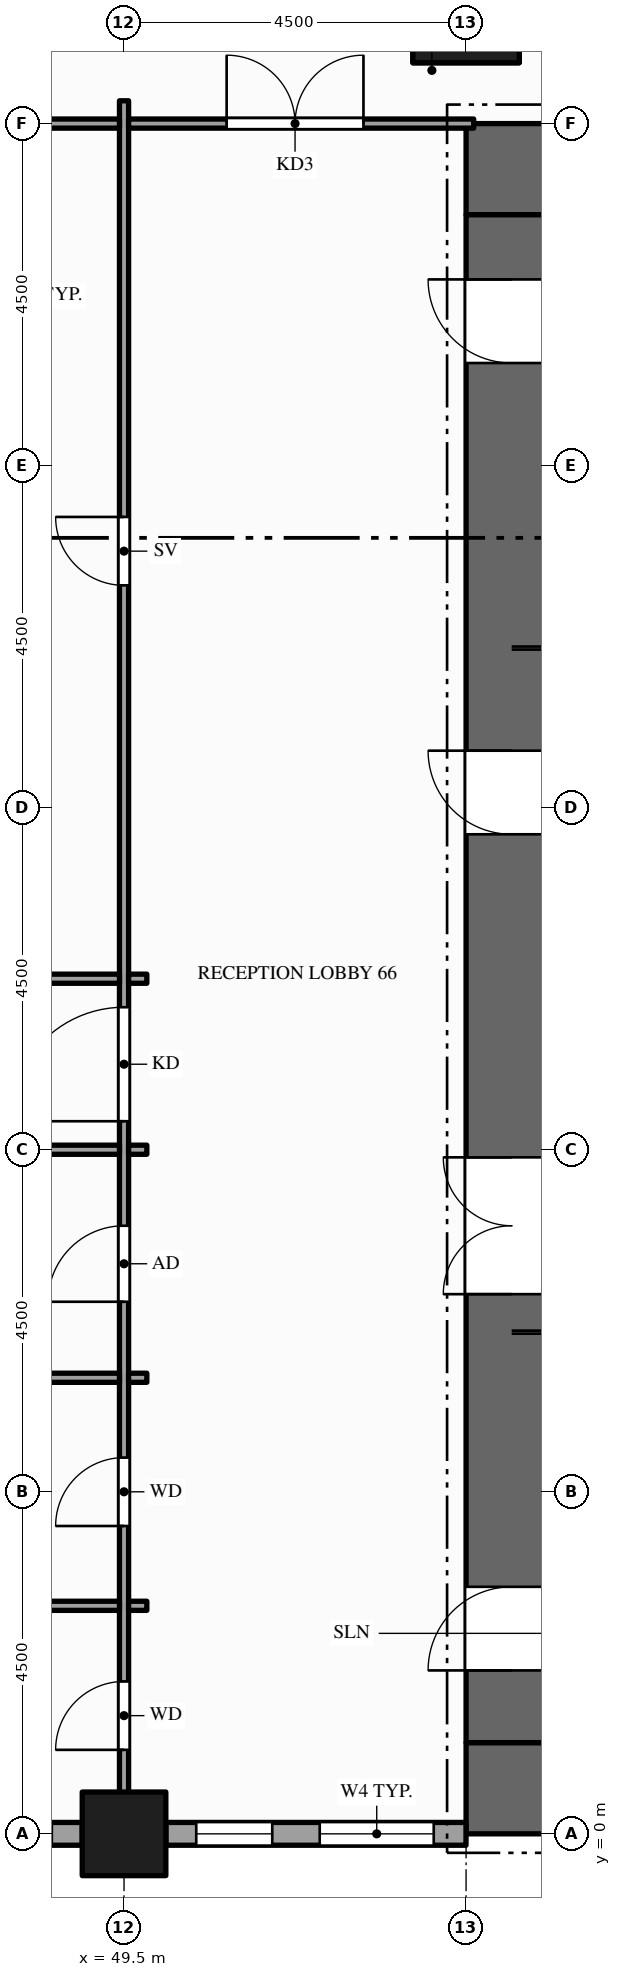
"""IFC4 building model, lengths in metres.
Left out: names, types, materials, properties, quantities, classifications, styles, units other than length and angle.
Written with IfcOpenShell. Run it as: python <this file> out.ifc"""

import sys

from ifc_helpers import new_model, si_unit, direction, frame, frame_2d, origin, origin_2d, place, context, subcontext, project, spatial, rectangle, hollow_rectangle, extrude, element, fill, save


model = new_model("IFC4")
c1 = context("Model", 3, precision=1e-05, world=origin(), true_north=direction((0.0, 1.0)))
c2 = subcontext(c1, "Body", "Model", "MODEL_VIEW")
j1 = project(units=[si_unit("LENGTHUNIT", "METRE"), si_unit("PLANEANGLEUNIT", "RADIAN")], contexts=[c1])
p1 = place(None, origin())
s1 = spatial("IfcSite", under=j1, at=p1, CompositionType="ELEMENT")
p2 = place(p1, origin())
s2 = spatial("IfcBuilding", under=s1, at=p2, CompositionType="ELEMENT")
p3 = place(p2, frame((0.0, 0.0, 24.0)))
s3 = spatial("IfcBuildingStorey", under=s2, at=p3, CompositionType="ELEMENT", Elevation=24.0)
for number, where, z_axis, x_axis in (
    (1, (67.5, 0.6, -0.15), (0.0, 0.0, 1.0), (-1.0, 0.0, 0.0)),
    (2, (54.0, 21.9, -0.15), (0.0, 0.0, 1.0), (1.0, 0.0, 0.0)),
):
    element("IfcWall", number, at=place(p3, frame(where, z_axis=z_axis, x_axis=x_axis)), inside=s3, PredefinedType="SHEAR", context=c2, shape_type="SweptSolid", body=[
        extrude(rectangle(XDim=13.5, YDim=1.2, at=frame_2d((6.75, 0.0))), origin(), (0.0, 0.0, 1.0), 5.0),
    ])
p4 = place(p3, frame((54.6, 1.2, -0.15), z_axis=(0.0, 0.0, 1.0), x_axis=(0.0, 1.0, 0.0)))
e3 = element("IfcWall", 3, at=p4, inside=s3, PredefinedType="SHEAR", context=c2, shape_type="SweptSolid", body=[
    extrude(rectangle(XDim=20.1, YDim=1.2, at=frame_2d((10.05, 0.0))), origin(), (0.0, 0.0, 1.0), 5.0),
])
p5 = place(p4, frame((5.9, 0.0, 0.15)))
e4 = element("IfcOpeningElement", 4, at=p5, cuts=e3, PredefinedType="OPENING", context=c2, shape_type="SweptSolid", body=[
    extrude(rectangle(XDim=1.8, YDim=2.1, at=frame_2d((0.9, 1.05))), frame((0.0, 0.61, 0.0), z_axis=(0.0, -1.0, 0.0), x_axis=(1.0, 0.0, 0.0)), (0.0, 0.0, 1.0), 1.22),
])
p6 = place(p4, frame((11.95, 0.0, 0.15)))
e5 = element("IfcOpeningElement", 5, at=p6, cuts=e3, PredefinedType="OPENING", context=c2, shape_type="SweptSolid", body=[
    extrude(rectangle(XDim=1.1, YDim=2.1, at=frame_2d((0.55, 1.05))), frame((0.0, 0.61, 0.0), z_axis=(0.0, -1.0, 0.0), x_axis=(1.0, 0.0, 0.0)), (0.0, 0.0, 1.0), 1.22),
])
p7 = place(p4, frame((0.95, 0.0, 0.15)))
e6 = element("IfcOpeningElement", 6, at=p7, cuts=e3, PredefinedType="OPENING", context=c2, shape_type="SweptSolid", body=[
    extrude(rectangle(XDim=1.1, YDim=2.1, at=frame_2d((0.55, 1.05))), frame((0.0, 0.61, 0.0), z_axis=(0.0, -1.0, 0.0), x_axis=(1.0, 0.0, 0.0)), (0.0, 0.0, 1.0), 1.22),
])
p8 = place(p4, frame((18.15, 0.0, 0.15)))
e7 = element("IfcOpeningElement", 7, at=p8, cuts=e3, PredefinedType="OPENING", context=c2, shape_type="SweptSolid", body=[
    extrude(rectangle(XDim=1.1, YDim=2.1, at=frame_2d((0.55, 1.05))), frame((0.0, 0.61, 0.0), z_axis=(0.0, -1.0, 0.0), x_axis=(1.0, 0.0, 0.0)), (0.0, 0.0, 1.0), 1.22),
])
p9 = place(p3, frame((49.5, 0.0, -0.25), z_axis=(0.0, 0.0, 1.0), x_axis=(1.0, 0.0, 0.0)))
e8 = element("IfcColumn", 8, at=p9, inside=s3, PredefinedType="COLUMN", context=c2, shape_type="SweptSolid", body=[
    extrude(hollow_rectangle(XDim=1.1, YDim=1.1, WallThickness=0.06, at=origin_2d()), origin(), (0.0, 0.0, 1.0), 4.95),
])
p10 = place(p3, frame((54.0, 24.0, -0.25), z_axis=(0.0, 0.0, 1.0), x_axis=(1.0, 0.0, 0.0)))
e9 = element("IfcColumn", 9, at=p10, inside=s3, PredefinedType="COLUMN", context=c2, shape_type="SweptSolid", body=[
    extrude(hollow_rectangle(XDim=1.4, YDim=1.4, WallThickness=0.08, at=origin_2d()), origin(), (0.0, 0.0, 1.0), 3.45),
])
p11 = place(p3, frame((54.0, 24.0, 3.2), z_axis=(0.0, 0.0, 1.0), x_axis=(1.0, 0.0, 0.0)))
e10 = element("IfcColumn", 10, at=p11, inside=s3, PredefinedType="COLUMN", context=c2, shape_type="SweptSolid", body=[
    extrude(rectangle(XDim=1.4, YDim=1.4, at=origin_2d()), origin(), (0.0, 0.0, 1.0), 1.5),
])
p12 = place(p3, frame((45.55, 0.0, 0.0), z_axis=(0.0, 0.0, 1.0), x_axis=(1.0, 0.0, 0.0)))
e11 = element("IfcWall", 11, at=p12, inside=s3, PredefinedType="STANDARD", context=c2, shape_type="SweptSolid", body=[
    extrude(rectangle(XDim=3.4, YDim=0.3, at=frame_2d((1.7, 0.0))), origin(), (0.0, 0.0, 1.0), 3.994),
])
p13 = place(p12, frame((0.4, 0.0, 0.9)))
e12 = element("IfcOpeningElement", 12, at=p13, cuts=e11, PredefinedType="OPENING", context=c2, shape_type="SweptSolid", body=[
    extrude(rectangle(XDim=1.0, YDim=2.75, at=frame_2d((0.5, 1.375))), frame((0.0, 0.16, 0.0), z_axis=(0.0, -1.0, 0.0), x_axis=(1.0, 0.0, 0.0)), (0.0, 0.0, 1.0), 0.32),
])
p14 = place(p12, frame((2.0, 0.0, 0.9)))
e13 = element("IfcOpeningElement", 13, at=p14, cuts=e11, PredefinedType="OPENING", context=c2, shape_type="SweptSolid", body=[
    extrude(rectangle(XDim=1.0, YDim=2.75, at=frame_2d((0.5, 1.375))), frame((0.0, 0.16, 0.0), z_axis=(0.0, -1.0, 0.0), x_axis=(1.0, 0.0, 0.0)), (0.0, 0.0, 1.0), 0.32),
])
p15 = place(p3, frame((50.05, 0.0, 0.0), z_axis=(0.0, 0.0, 1.0), x_axis=(1.0, 0.0, 0.0)))
e14 = element("IfcWall", 14, at=p15, inside=s3, PredefinedType="STANDARD", context=c2, shape_type="SweptSolid", body=[
    extrude(rectangle(XDim=3.949, YDim=0.3, at=frame_2d((1.975, 0.0))), origin(), (0.0, 0.0, 1.0), 3.994),
])
p16 = place(p15, frame((0.4, 0.0, 0.9)))
e15 = element("IfcOpeningElement", 15, at=p16, cuts=e14, PredefinedType="OPENING", context=c2, shape_type="SweptSolid", body=[
    extrude(rectangle(XDim=1.0, YDim=2.75, at=frame_2d((0.5, 1.375))), frame((0.0, 0.16, 0.0), z_axis=(0.0, -1.0, 0.0), x_axis=(1.0, 0.0, 0.0)), (0.0, 0.0, 1.0), 0.32),
])
p17 = place(p15, frame((2.024, 0.0, 0.9)))
e16 = element("IfcOpeningElement", 16, at=p17, cuts=e14, PredefinedType="OPENING", context=c2, shape_type="SweptSolid", body=[
    extrude(rectangle(XDim=1.5, YDim=2.75, at=frame_2d((0.75, 1.375))), frame((0.0, 0.16, 0.0), z_axis=(0.0, -1.0, 0.0), x_axis=(1.0, 0.0, 0.0)), (0.0, 0.0, 1.0), 0.32),
])
p18 = place(p3, frame((49.5, 0.15, 0.0), z_axis=(0.0, 0.0, 1.0), x_axis=(0.0, 1.0, 0.0)))
e17 = element("IfcWall", 17, at=p18, inside=s3, PredefinedType="PARTITIONING", context=c2, shape_type="SweptSolid", body=[
    extrude(rectangle(XDim=22.65, YDim=0.12, at=frame_2d((11.325, 0.0))), origin(), (0.0, 0.0, 1.0), 3.3),
])
p19 = place(p18, frame((0.955, 0.0, 0.0)))
e18 = element("IfcOpeningElement", 18, at=p19, cuts=e17, PredefinedType="OPENING", context=c2, shape_type="SweptSolid", body=[
    extrude(rectangle(XDim=0.9, YDim=2.1, at=frame_2d((0.45, 1.05))), frame((0.0, 0.07, 0.0), z_axis=(0.0, -1.0, 0.0), x_axis=(1.0, 0.0, 0.0)), (0.0, 0.0, 1.0), 0.14),
])
p20 = place(p18, frame((3.9, 0.0, 0.0)))
e19 = element("IfcOpeningElement", 19, at=p20, cuts=e17, PredefinedType="OPENING", context=c2, shape_type="SweptSolid", body=[
    extrude(rectangle(XDim=0.9, YDim=2.1, at=frame_2d((0.45, 1.05))), frame((0.0, 0.07, 0.0), z_axis=(0.0, -1.0, 0.0), x_axis=(1.0, 0.0, 0.0)), (0.0, 0.0, 1.0), 0.14),
])
p21 = place(p18, frame((6.85, 0.0, 0.0)))
e20 = element("IfcOpeningElement", 20, at=p21, cuts=e17, PredefinedType="OPENING", context=c2, shape_type="SweptSolid", body=[
    extrude(rectangle(XDim=1.0, YDim=2.1, at=frame_2d((0.5, 1.05))), frame((0.0, 0.07, 0.0), z_axis=(0.0, -1.0, 0.0), x_axis=(1.0, 0.0, 0.0)), (0.0, 0.0, 1.0), 0.14),
])
p22 = place(p18, frame((16.275, 0.0, 0.0)))
e21 = element("IfcOpeningElement", 21, at=p22, cuts=e17, PredefinedType="OPENING", context=c2, shape_type="SweptSolid", body=[
    extrude(rectangle(XDim=0.9, YDim=2.1, at=frame_2d((0.45, 1.05))), frame((0.0, 0.07, 0.0), z_axis=(0.0, -1.0, 0.0), x_axis=(1.0, 0.0, 0.0)), (0.0, 0.0, 1.0), 0.14),
])
p23 = place(p18, frame((9.225, 0.0, 0.0)))
e22 = element("IfcOpeningElement", 22, at=p23, cuts=e17, PredefinedType="OPENING", context=c2, shape_type="SweptSolid", body=[
    extrude(rectangle(XDim=1.5, YDim=2.1, at=frame_2d((0.75, 1.05))), frame((0.0, 0.07, 0.0), z_axis=(0.0, -1.0, 0.0), x_axis=(1.0, 0.0, 0.0)), (0.0, 0.0, 1.0), 0.14),
])
p24 = place(p3, frame((45.06, 3.0, 0.0), z_axis=(0.0, 0.0, 1.0), x_axis=(1.0, 0.0, 0.0)))
e23 = element("IfcWall", 23, at=p24, inside=s3, PredefinedType="PARTITIONING", context=c2, shape_type="SweptSolid", body=[
    extrude(rectangle(XDim=4.38, YDim=0.12, at=frame_2d((2.19, 0.0))), origin(), (0.0, 0.0, 1.0), 3.938),
])
p25 = place(p3, frame((49.56, 3.0, 0.0), z_axis=(0.0, 0.0, 1.0), x_axis=(1.0, 0.0, 0.0)))
e24 = element("IfcWall", 24, at=p25, inside=s3, PredefinedType="PARTITIONING", context=c2, shape_type="SweptSolid", body=[
    extrude(rectangle(XDim=0.24, YDim=0.12, at=frame_2d((0.12, 0.0))), origin(), (0.0, 0.0, 1.0), 3.938),
])
p26 = place(p3, frame((45.06, 6.0, 0.0), z_axis=(0.0, 0.0, 1.0), x_axis=(1.0, 0.0, 0.0)))
e25 = element("IfcWall", 25, at=p26, inside=s3, PredefinedType="PARTITIONING", context=c2, shape_type="SweptSolid", body=[
    extrude(rectangle(XDim=4.38, YDim=0.12, at=frame_2d((2.19, 0.0))), origin(), (0.0, 0.0, 1.0), 3.938),
])
p27 = place(p3, frame((49.56, 6.0, 0.0), z_axis=(0.0, 0.0, 1.0), x_axis=(1.0, 0.0, 0.0)))
e26 = element("IfcWall", 26, at=p27, inside=s3, PredefinedType="PARTITIONING", context=c2, shape_type="SweptSolid", body=[
    extrude(rectangle(XDim=0.24, YDim=0.12, at=frame_2d((0.12, 0.0))), origin(), (0.0, 0.0, 1.0), 3.938),
])
p28 = place(p3, frame((45.06, 9.0, 0.0), z_axis=(0.0, 0.0, 1.0), x_axis=(1.0, 0.0, 0.0)))
e27 = element("IfcWall", 27, at=p28, inside=s3, PredefinedType="PARTITIONING", context=c2, shape_type="SweptSolid", body=[
    extrude(rectangle(XDim=4.38, YDim=0.12, at=frame_2d((2.19, 0.0))), origin(), (0.0, 0.0, 1.0), 3.938),
])
p29 = place(p3, frame((49.56, 9.0, 0.0), z_axis=(0.0, 0.0, 1.0), x_axis=(1.0, 0.0, 0.0)))
e28 = element("IfcWall", 28, at=p29, inside=s3, PredefinedType="PARTITIONING", context=c2, shape_type="SweptSolid", body=[
    extrude(rectangle(XDim=0.24, YDim=0.12, at=frame_2d((0.12, 0.0))), origin(), (0.0, 0.0, 1.0), 3.938),
])
p30 = place(p3, frame((45.06, 11.25, 0.0), z_axis=(0.0, 0.0, 1.0), x_axis=(1.0, 0.0, 0.0)))
e29 = element("IfcWall", 29, at=p30, inside=s3, PredefinedType="PARTITIONING", context=c2, shape_type="SweptSolid", body=[
    extrude(rectangle(XDim=4.38, YDim=0.12, at=frame_2d((2.19, 0.0))), origin(), (0.0, 0.0, 1.0), 3.938),
])
p31 = place(p3, frame((49.56, 11.25, 0.0), z_axis=(0.0, 0.0, 1.0), x_axis=(1.0, 0.0, 0.0)))
e30 = element("IfcWall", 30, at=p31, inside=s3, PredefinedType="PARTITIONING", context=c2, shape_type="SweptSolid", body=[
    extrude(rectangle(XDim=0.24, YDim=0.12, at=frame_2d((0.12, 0.0))), origin(), (0.0, 0.0, 1.0), 3.938),
])
p32 = place(p3, frame((45.06, 22.5, 0.0), z_axis=(0.0, 0.0, 1.0), x_axis=(1.0, 0.0, 0.0)))
e31 = element("IfcWall", 31, at=p32, inside=s3, PredefinedType="PARTITIONING", context=c2, shape_type="SweptSolid", body=[
    extrude(rectangle(XDim=4.38, YDim=0.12, at=frame_2d((2.19, 0.0))), origin(), (0.0, 0.0, 1.0), 3.938),
])
p33 = place(p3, frame((49.56, 22.5, 0.0), z_axis=(0.0, 0.0, 1.0), x_axis=(1.0, 0.0, 0.0)))
e32 = element("IfcWall", 32, at=p33, inside=s3, PredefinedType="PARTITIONING", context=c2, shape_type="SweptSolid", body=[
    extrude(rectangle(XDim=4.54, YDim=0.12, at=frame_2d((2.27, 0.0))), origin(), (0.0, 0.0, 1.0), 3.938),
])
p34 = place(p33, frame((1.29, 0.0, 0.0)))
e33 = element("IfcOpeningElement", 33, at=p34, cuts=e32, PredefinedType="OPENING", context=c2, shape_type="SweptSolid", body=[
    extrude(rectangle(XDim=1.8, YDim=2.1, at=frame_2d((0.9, 1.05))), frame((0.0, 0.07, 0.0), z_axis=(0.0, -1.0, 0.0), x_axis=(1.0, 0.0, 0.0)), (0.0, 0.0, 1.0), 0.14),
])
p35 = place(p16, origin())
e34 = element("IfcWindow", 34, at=p35, inside=s3, PartitioningType="SINGLE_PANEL", PredefinedType="WINDOW", context=c2, shape_type="SweptSolid", body=[
    extrude(rectangle(XDim=1.0, YDim=2.75, at=frame_2d((0.5, 1.375))), frame((0.0, 0.03, 0.0), z_axis=(0.0, -1.0, 0.0), x_axis=(1.0, 0.0, 0.0)), (0.0, 0.0, 1.0), 0.06),
])
fill(e15, e34)
p36 = place(p17, origin())
e35 = element("IfcWindow", 35, at=p36, inside=s3, PartitioningType="SINGLE_PANEL", PredefinedType="WINDOW", context=c2, shape_type="SweptSolid", body=[
    extrude(rectangle(XDim=1.5, YDim=2.75, at=frame_2d((0.75, 1.375))), frame((0.0, 0.03, 0.0), z_axis=(0.0, -1.0, 0.0), x_axis=(1.0, 0.0, 0.0)), (0.0, 0.0, 1.0), 0.06),
])
fill(e16, e35)
p37 = place(p5, origin())
e36 = element("IfcDoor", 36, at=p37, inside=s3, OperationType="DOUBLE_DOOR_SINGLE_SWING", PredefinedType="DOOR", context=c2, shape_type="SweptSolid", body=[
    extrude(rectangle(XDim=1.8, YDim=2.1, at=frame_2d((0.9, 1.05))), frame((0.0, 0.025, 0.0), z_axis=(0.0, -1.0, 0.0), x_axis=(1.0, 0.0, 0.0)), (0.0, 0.0, 1.0), 0.05),
])
fill(e4, e36)
p38 = place(p6, origin())
e37 = element("IfcDoor", 37, at=p38, inside=s3, OperationType="SINGLE_SWING_RIGHT", PredefinedType="DOOR", context=c2, shape_type="SweptSolid", body=[
    extrude(rectangle(XDim=1.1, YDim=2.1, at=frame_2d((0.55, 1.05))), frame((0.0, 0.025, 0.0), z_axis=(0.0, -1.0, 0.0), x_axis=(1.0, 0.0, 0.0)), (0.0, 0.0, 1.0), 0.05),
])
fill(e5, e37)
p39 = place(p7, origin())
e38 = element("IfcDoor", 38, at=p39, inside=s3, OperationType="SINGLE_SWING_LEFT", PredefinedType="DOOR", context=c2, shape_type="SweptSolid", body=[
    extrude(rectangle(XDim=1.1, YDim=2.1, at=frame_2d((0.55, 1.05))), frame((0.0, 0.025, 0.0), z_axis=(0.0, -1.0, 0.0), x_axis=(1.0, 0.0, 0.0)), (0.0, 0.0, 1.0), 0.05),
])
fill(e6, e38)
p40 = place(p8, origin())
e39 = element("IfcDoor", 39, at=p40, inside=s3, OperationType="SINGLE_SWING_RIGHT", PredefinedType="DOOR", context=c2, shape_type="SweptSolid", body=[
    extrude(rectangle(XDim=1.1, YDim=2.1, at=frame_2d((0.55, 1.05))), frame((0.0, 0.025, 0.0), z_axis=(0.0, -1.0, 0.0), x_axis=(1.0, 0.0, 0.0)), (0.0, 0.0, 1.0), 0.05),
])
fill(e7, e39)
p41 = place(p19, origin())
e40 = element("IfcDoor", 40, at=p41, inside=s3, OperationType="SINGLE_SWING_LEFT", PredefinedType="DOOR", context=c2, shape_type="SweptSolid", body=[
    extrude(rectangle(XDim=0.9, YDim=2.1, at=frame_2d((0.45, 1.05))), frame((0.0, 0.025, 0.0), z_axis=(0.0, -1.0, 0.0), x_axis=(1.0, 0.0, 0.0)), (0.0, 0.0, 1.0), 0.05),
])
fill(e18, e40)
p42 = place(p20, origin())
e41 = element("IfcDoor", 41, at=p42, inside=s3, OperationType="SINGLE_SWING_LEFT", PredefinedType="DOOR", context=c2, shape_type="SweptSolid", body=[
    extrude(rectangle(XDim=0.9, YDim=2.1, at=frame_2d((0.45, 1.05))), frame((0.0, 0.025, 0.0), z_axis=(0.0, -1.0, 0.0), x_axis=(1.0, 0.0, 0.0)), (0.0, 0.0, 1.0), 0.05),
])
fill(e19, e41)
p43 = place(p21, origin())
e42 = element("IfcDoor", 42, at=p43, inside=s3, OperationType="SINGLE_SWING_LEFT", PredefinedType="DOOR", context=c2, shape_type="SweptSolid", body=[
    extrude(rectangle(XDim=1.0, YDim=2.1, at=frame_2d((0.5, 1.05))), frame((0.0, 0.025, 0.0), z_axis=(0.0, -1.0, 0.0), x_axis=(1.0, 0.0, 0.0)), (0.0, 0.0, 1.0), 0.05),
])
fill(e20, e42)
p44 = place(p22, origin())
e43 = element("IfcDoor", 43, at=p44, inside=s3, OperationType="SINGLE_SWING_RIGHT", PredefinedType="DOOR", context=c2, shape_type="SweptSolid", body=[
    extrude(rectangle(XDim=0.9, YDim=2.1, at=frame_2d((0.45, 1.05))), frame((0.0, 0.025, 0.0), z_axis=(0.0, -1.0, 0.0), x_axis=(1.0, 0.0, 0.0)), (0.0, 0.0, 1.0), 0.05),
])
fill(e21, e43)
p45 = place(p23, origin())
e44 = element("IfcDoor", 44, at=p45, inside=s3, OperationType="SINGLE_SWING_LEFT", PredefinedType="DOOR", context=c2, shape_type="SweptSolid", body=[
    extrude(rectangle(XDim=1.5, YDim=2.1, at=frame_2d((0.75, 1.05))), frame((0.0, 0.025, 0.0), z_axis=(0.0, -1.0, 0.0), x_axis=(1.0, 0.0, 0.0)), (0.0, 0.0, 1.0), 0.05),
])
fill(e22, e44)
p46 = place(p34, origin())
e45 = element("IfcDoor", 45, at=p46, inside=s3, OperationType="DOUBLE_DOOR_SINGLE_SWING", PredefinedType="DOOR", context=c2, shape_type="SweptSolid", body=[
    extrude(rectangle(XDim=1.8, YDim=2.1, at=frame_2d((0.9, 1.05))), frame((0.0, 0.025, 0.0), z_axis=(0.0, -1.0, 0.0), x_axis=(1.0, 0.0, 0.0)), (0.0, 0.0, 1.0), 0.05),
])
fill(e33, e45)
save(model, sys.argv[1])
